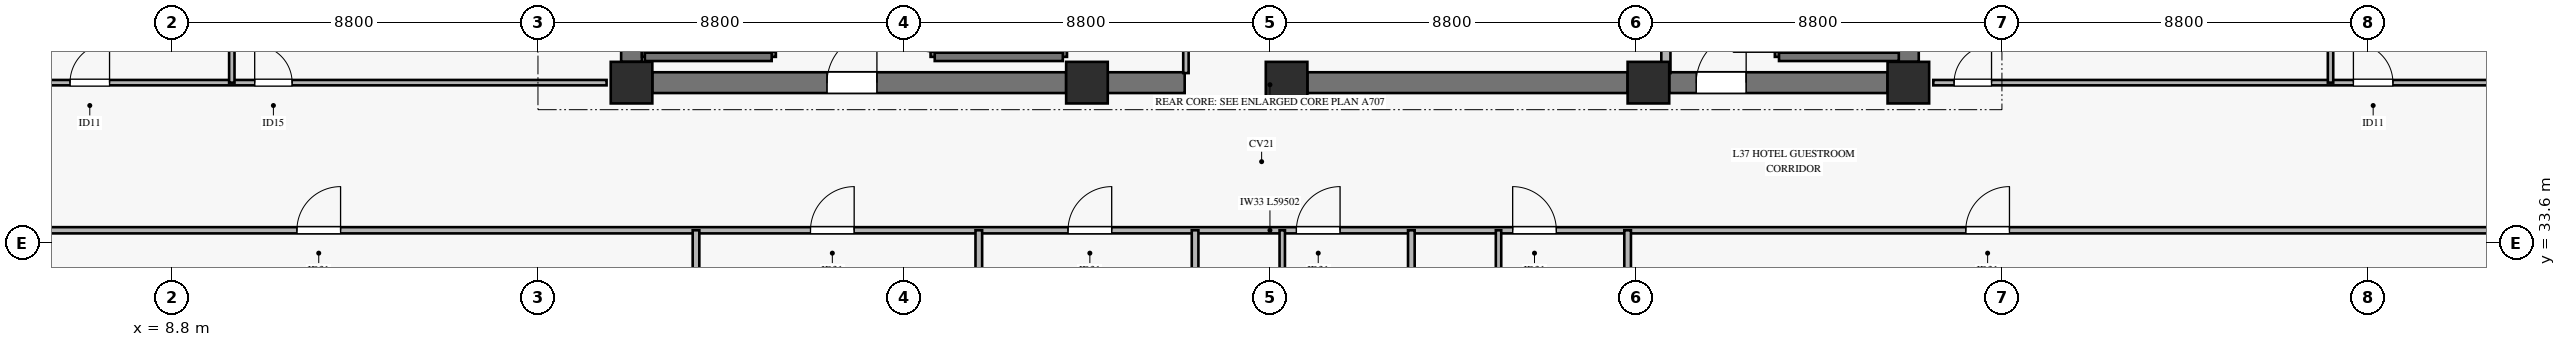
"""IFC4 building model, lengths in metres.
Left out: names, types, materials, properties, quantities, classifications, styles, units other than length and angle.
Written with IfcOpenShell. Run it as: python <this file> out.ifc"""

import sys

from ifc_helpers import new_model, si_unit, direction, frame, frame_2d, origin, origin_2d, place, context, subcontext, project, spatial, rectangle, extrude, source, transform, mapped, element, fill, save


model = new_model("IFC4")
c1 = context("Model", 3, precision=1e-05, world=origin(), true_north=direction((0.0, 1.0)))
c2 = subcontext(c1, "Body", "Model", "MODEL_VIEW")
j1 = project(units=[si_unit("LENGTHUNIT", "METRE"), si_unit("PLANEANGLEUNIT", "RADIAN")], contexts=[c1])
p1 = place(None, origin())
s1 = spatial("IfcSite", under=j1, at=p1, CompositionType="ELEMENT")
p2 = place(p1, origin())
s2 = spatial("IfcBuilding", under=s1, at=p2, CompositionType="ELEMENT")
p3 = place(p2, frame((0.0, 0.0, 152.7)))
s3 = spatial("IfcBuildingStorey", under=s2, at=p3, CompositionType="ELEMENT", Elevation=152.7)
m1 = source(origin(), c2, "Body", "SweptSolid", [
    extrude(rectangle(XDim=1.0, YDim=1.0, at=origin_2d()), origin(), (0.0, 0.0, 1.0), 3.27),
])
for number, where, z_axis, x_axis in (
    (1, (19.85, 37.45, 0.0), (0.0, 0.0, 1.0), (1.0, 0.0, 0.0)),
    (2, (30.8, 37.45, 0.0), (0.0, 0.0, 1.0), (1.0, 0.0, 0.0)),
    (3, (35.6, 37.45, 0.0), (0.0, 0.0, 1.0), (1.0, 0.0, 0.0)),
    (4, (44.3, 37.45, 0.0), (0.0, 0.0, 1.0), (1.0, 0.0, 0.0)),
    (5, (50.55, 37.45, 0.0), (0.0, 0.0, 1.0), (1.0, 0.0, 0.0)),
):
    element("IfcColumn", number, at=place(p3, frame(where, z_axis=z_axis, x_axis=x_axis)), inside=s3, PredefinedType="PILASTER", context=c2, shape_type="MappedRepresentation", body=[
        mapped(m1, transform((0.0, 0.0, 0.0), x_axis=(1.0, 0.0, 0.0), y_axis=(0.0, 1.0, 0.0), z_axis=(0.0, 0.0, 1.0), scale=1.0)),
    ])
p4 = place(p3, frame((20.35, 37.45, 0.0), z_axis=(0.0, 0.0, 1.0), x_axis=(1.0, 0.0, 0.0)))
e6 = element("IfcWall", 6, at=p4, inside=s3, PredefinedType="SHEAR", context=c2, shape_type="SweptSolid", body=[
    extrude(rectangle(XDim=9.95, YDim=0.5, at=frame_2d((4.975, 0.0))), origin(), (0.0, 0.0, 1.0), 3.27),
])
p5 = place(p4, frame((4.2, 0.0, 0.0)))
e7 = element("IfcOpeningElement", 7, at=p5, cuts=e6, PredefinedType="OPENING", context=c2, shape_type="SweptSolid", body=[
    extrude(rectangle(XDim=1.2, YDim=2.15, at=frame_2d((0.6, 1.075))), frame((0.0, 0.26, 0.0), z_axis=(0.0, -1.0, 0.0), x_axis=(1.0, 0.0, 0.0)), (0.0, 0.0, 1.0), 0.52),
])
p6 = place(p3, frame((31.3, 37.45, 0.0), z_axis=(0.0, 0.0, 1.0), x_axis=(1.0, 0.0, 0.0)))
e8 = element("IfcWall", 8, at=p6, inside=s3, PredefinedType="SHEAR", context=c2, shape_type="SweptSolid", body=[
    extrude(rectangle(XDim=1.85, YDim=0.5, at=frame_2d((0.925, 0.0))), origin(), (0.0, 0.0, 1.0), 3.27),
])
p7 = place(p3, frame((36.1, 37.45, 0.0), z_axis=(0.0, 0.0, 1.0), x_axis=(1.0, 0.0, 0.0)))
e9 = element("IfcWall", 9, at=p7, inside=s3, PredefinedType="SHEAR", context=c2, shape_type="SweptSolid", body=[
    extrude(rectangle(XDim=7.7, YDim=0.5, at=frame_2d((3.85, 0.0))), origin(), (0.0, 0.0, 1.0), 3.27),
])
p8 = place(p3, frame((44.8, 37.45, 0.0), z_axis=(0.0, 0.0, 1.0), x_axis=(1.0, 0.0, 0.0)))
e10 = element("IfcWall", 10, at=p8, inside=s3, PredefinedType="SHEAR", context=c2, shape_type="SweptSolid", body=[
    extrude(rectangle(XDim=5.25, YDim=0.5, at=frame_2d((2.625, 0.0))), origin(), (0.0, 0.0, 1.0), 3.27),
])
p9 = place(p8, frame((0.65, 0.0, 0.0)))
e11 = element("IfcOpeningElement", 11, at=p9, cuts=e10, PredefinedType="OPENING", context=c2, shape_type="SweptSolid", body=[
    extrude(rectangle(XDim=1.2, YDim=2.15, at=frame_2d((0.6, 1.075))), frame((0.0, 0.26, 0.0), z_axis=(0.0, -1.0, 0.0), x_axis=(1.0, 0.0, 0.0)), (0.0, 0.0, 1.0), 0.52),
])
for number, where, z_axis, x_axis in (
    (12, (19.85, 37.95, 0.0), (0.0, 0.0, 1.0), (0.0, 1.0, 0.0)),
    (13, (50.55, 37.95, 0.0), (0.0, 0.0, 1.0), (0.0, 1.0, 0.0)),
):
    element("IfcWall", number, at=place(p3, frame(where, z_axis=z_axis, x_axis=x_axis)), inside=s3, PredefinedType="SHEAR", context=c2, shape_type="SweptSolid", body=[
        extrude(rectangle(XDim=8.1, YDim=0.5, at=frame_2d((4.05, 0.0))), origin(), (0.0, 0.0, 1.0), 3.27),
    ])
p10 = place(p3, frame((20.17, 38.07, 0.0), z_axis=(0.0, 0.0, 1.0), x_axis=(0.0, 1.0, 0.0)))
e14 = element("IfcWall", 14, at=p10, inside=s3, PredefinedType="SOLIDWALL", context=c2, shape_type="SweptSolid", body=[
    extrude(rectangle(XDim=7.25, YDim=0.14, at=frame_2d((3.625, 0.0))), origin(), (0.0, 0.0, 1.0), 3.5),
])
p11 = place(p3, frame((23.22, 38.07, 0.0), z_axis=(0.0, 0.0, 1.0), x_axis=(0.0, 1.0, 0.0)))
e15 = element("IfcWall", 15, at=p11, inside=s3, PredefinedType="SOLIDWALL", context=c2, shape_type="SweptSolid", body=[
    extrude(rectangle(XDim=7.25, YDim=0.2, at=frame_2d((3.625, 0.0))), origin(), (0.0, 0.0, 1.0), 3.5),
])
p12 = place(p11, frame((0.11, 0.0, 0.0)))
e16 = element("IfcOpeningElement", 16, at=p12, cuts=e15, PredefinedType="OPENING", context=c2, shape_type="SweptSolid", body=[
    extrude(rectangle(XDim=1.1, YDim=2.15, at=frame_2d((0.55, 1.075))), frame((0.0, 0.11, 0.0), z_axis=(0.0, -1.0, 0.0), x_axis=(1.0, 0.0, 0.0)), (0.0, 0.0, 1.0), 0.22),
])
p13 = place(p3, frame((20.17, 38.07, 0.0), z_axis=(0.0, 0.0, 1.0), x_axis=(1.0, 0.0, 0.0)))
e17 = element("IfcWall", 17, at=p13, inside=s3, PredefinedType="SOLIDWALL", context=c2, shape_type="SweptSolid", body=[
    extrude(rectangle(XDim=3.05, YDim=0.2, at=frame_2d((1.525, 0.0))), origin(), (0.0, 0.0, 1.0), 3.5),
])
p14 = place(p3, frame((27.14, 38.07, 0.0), z_axis=(0.0, 0.0, 1.0), x_axis=(0.0, 1.0, 0.0)))
e18 = element("IfcWall", 18, at=p14, inside=s3, PredefinedType="SOLIDWALL", context=c2, shape_type="SweptSolid", body=[
    extrude(rectangle(XDim=7.25, YDim=0.2, at=frame_2d((3.625, 0.0))), origin(), (0.0, 0.0, 1.0), 3.5),
])
p15 = place(p14, frame((0.11, 0.0, 0.0)))
e19 = element("IfcOpeningElement", 19, at=p15, cuts=e18, PredefinedType="OPENING", context=c2, shape_type="SweptSolid", body=[
    extrude(rectangle(XDim=1.1, YDim=2.15, at=frame_2d((0.55, 1.075))), frame((0.0, 0.11, 0.0), z_axis=(0.0, -1.0, 0.0), x_axis=(1.0, 0.0, 0.0)), (0.0, 0.0, 1.0), 0.22),
])
p16 = place(p3, frame((30.22, 38.07, 0.0), z_axis=(0.0, 0.0, 1.0), x_axis=(0.0, 1.0, 0.0)))
e20 = element("IfcWall", 20, at=p16, inside=s3, PredefinedType="SOLIDWALL", context=c2, shape_type="SweptSolid", body=[
    extrude(rectangle(XDim=7.25, YDim=0.2, at=frame_2d((3.625, 0.0))), origin(), (0.0, 0.0, 1.0), 3.5),
])
p17 = place(p3, frame((27.14, 38.07, 0.0), z_axis=(0.0, 0.0, 1.0), x_axis=(1.0, 0.0, 0.0)))
e21 = element("IfcWall", 21, at=p17, inside=s3, PredefinedType="SOLIDWALL", context=c2, shape_type="SweptSolid", body=[
    extrude(rectangle(XDim=3.08, YDim=0.2, at=frame_2d((1.54, 0.0))), origin(), (0.0, 0.0, 1.0), 3.5),
])
p18 = place(p3, frame((47.44, 38.07, 0.0), z_axis=(0.0, 0.0, 1.0), x_axis=(0.0, 1.0, 0.0)))
e22 = element("IfcWall", 22, at=p18, inside=s3, PredefinedType="SOLIDWALL", context=c2, shape_type="SweptSolid", body=[
    extrude(rectangle(XDim=7.25, YDim=0.2, at=frame_2d((3.625, 0.0))), origin(), (0.0, 0.0, 1.0), 3.5),
])
p19 = place(p18, frame((0.11, 0.0, 0.0)))
e23 = element("IfcOpeningElement", 23, at=p19, cuts=e22, PredefinedType="OPENING", context=c2, shape_type="SweptSolid", body=[
    extrude(rectangle(XDim=1.1, YDim=2.15, at=frame_2d((0.55, 1.075))), frame((0.0, 0.11, 0.0), z_axis=(0.0, -1.0, 0.0), x_axis=(1.0, 0.0, 0.0)), (0.0, 0.0, 1.0), 0.22),
])
p20 = place(p3, frame((47.44, 38.07, 0.0), z_axis=(0.0, 0.0, 1.0), x_axis=(1.0, 0.0, 0.0)))
e24 = element("IfcWall", 24, at=p20, inside=s3, PredefinedType="SOLIDWALL", context=c2, shape_type="SweptSolid", body=[
    extrude(rectangle(XDim=2.88, YDim=0.2, at=frame_2d((1.44, 0.0))), origin(), (0.0, 0.0, 1.0), 3.5),
])
p21 = place(p3, frame((44.72, 37.68, 0.0), z_axis=(0.0, 0.0, 1.0), x_axis=(0.0, 1.0, 0.0)))
e25 = element("IfcWall", 25, at=p21, inside=s3, PredefinedType="SOLIDWALL", context=c2, shape_type="SweptSolid", body=[
    extrude(rectangle(XDim=7.54, YDim=0.22, at=frame_2d((3.77, 0.0))), origin(), (0.0, 0.0, 1.0), 3.27),
])
p22 = place(p3, frame((33.18, 37.68, 0.0), z_axis=(0.0, 0.0, 1.0), x_axis=(0.0, 1.0, 0.0)))
e26 = element("IfcWall", 26, at=p22, inside=s3, PredefinedType="PARTITIONING", context=c2, shape_type="SweptSolid", body=[
    extrude(rectangle(XDim=6.47, YDim=0.13, at=frame_2d((3.235, 0.0))), origin(), (0.0, 0.0, 1.0), 2.355),
])
p23 = place(p22, frame((1.27, 0.0, 0.0)))
e27 = element("IfcOpeningElement", 27, at=p23, cuts=e26, PredefinedType="OPENING", context=c2, shape_type="SweptSolid", body=[
    extrude(rectangle(XDim=0.9, YDim=2.1, at=frame_2d((0.45, 1.05))), frame((0.0, 0.075, 0.0), z_axis=(0.0, -1.0, 0.0), x_axis=(1.0, 0.0, 0.0)), (0.0, 0.0, 1.0), 0.15),
])
p24 = place(p22, frame((4.62, 0.0, 0.0)))
e28 = element("IfcOpeningElement", 28, at=p24, cuts=e26, PredefinedType="OPENING", context=c2, shape_type="SweptSolid", body=[
    extrude(rectangle(XDim=0.9, YDim=2.1, at=frame_2d((0.45, 1.05))), frame((0.0, 0.075, 0.0), z_axis=(0.0, -1.0, 0.0), x_axis=(1.0, 0.0, 0.0)), (0.0, 0.0, 1.0), 0.15),
])
p25 = place(p3, frame((5.449, 33.9, 0.0), z_axis=(0.0, 0.0, 1.0), x_axis=(1.0, 0.0, 0.0)))
e29 = element("IfcWall", 29, at=p25, inside=s3, PredefinedType="PARTITIONING", context=c2, shape_type="SweptSolid", body=[
    extrude(rectangle(XDim=59.502, YDim=0.15, at=frame_2d((29.751, 0.0))), origin(), (0.0, 0.0, 1.0), 2.455),
])
p26 = place(p25, frame((6.355, 0.0, 0.0)))
e30 = element("IfcOpeningElement", 30, at=p26, cuts=e29, PredefinedType="OPENING", context=c2, shape_type="SweptSolid", body=[
    extrude(rectangle(XDim=1.05, YDim=2.15, at=frame_2d((0.525, 1.075))), frame((0.0, 0.085, 0.0), z_axis=(0.0, -1.0, 0.0), x_axis=(1.0, 0.0, 0.0)), (0.0, 0.0, 1.0), 0.17),
])
p27 = place(p25, frame((18.704, 0.0, 0.0)))
e31 = element("IfcOpeningElement", 31, at=p27, cuts=e29, PredefinedType="OPENING", context=c2, shape_type="SweptSolid", body=[
    extrude(rectangle(XDim=1.05, YDim=2.15, at=frame_2d((0.525, 1.075))), frame((0.0, 0.085, 0.0), z_axis=(0.0, -1.0, 0.0), x_axis=(1.0, 0.0, 0.0)), (0.0, 0.0, 1.0), 0.17),
])
p28 = place(p25, frame((24.896, 0.0, 0.0)))
e32 = element("IfcOpeningElement", 32, at=p28, cuts=e29, PredefinedType="OPENING", context=c2, shape_type="SweptSolid", body=[
    extrude(rectangle(XDim=1.05, YDim=2.15, at=frame_2d((0.525, 1.075))), frame((0.0, 0.085, 0.0), z_axis=(0.0, -1.0, 0.0), x_axis=(1.0, 0.0, 0.0)), (0.0, 0.0, 1.0), 0.17),
])
p29 = place(p25, frame((30.387, 0.0, 0.0)))
e33 = element("IfcOpeningElement", 33, at=p29, cuts=e29, PredefinedType="OPENING", context=c2, shape_type="SweptSolid", body=[
    extrude(rectangle(XDim=1.05, YDim=2.15, at=frame_2d((0.525, 1.075))), frame((0.0, 0.085, 0.0), z_axis=(0.0, -1.0, 0.0), x_axis=(1.0, 0.0, 0.0)), (0.0, 0.0, 1.0), 0.17),
])
p30 = place(p25, frame((35.587, 0.0, 0.0)))
e34 = element("IfcOpeningElement", 34, at=p30, cuts=e29, PredefinedType="OPENING", context=c2, shape_type="SweptSolid", body=[
    extrude(rectangle(XDim=1.05, YDim=2.15, at=frame_2d((0.525, 1.075))), frame((0.0, 0.085, 0.0), z_axis=(0.0, -1.0, 0.0), x_axis=(1.0, 0.0, 0.0)), (0.0, 0.0, 1.0), 0.17),
])
p31 = place(p25, frame((46.482, 0.0, 0.0)))
e35 = element("IfcOpeningElement", 35, at=p31, cuts=e29, PredefinedType="OPENING", context=c2, shape_type="SweptSolid", body=[
    extrude(rectangle(XDim=1.05, YDim=2.15, at=frame_2d((0.525, 1.075))), frame((0.0, 0.085, 0.0), z_axis=(0.0, -1.0, 0.0), x_axis=(1.0, 0.0, 0.0)), (0.0, 0.0, 1.0), 0.17),
])
for number, where, z_axis, x_axis in (
    (36, (21.4, 8.572, 0.0), (0.0, 0.0, 1.0), (0.0, 1.0, 0.0)),
    (37, (28.2, 8.572, 0.0), (0.0, 0.0, 1.0), (0.0, 1.0, 0.0)),
    (38, (33.4, 8.572, 0.0), (0.0, 0.0, 1.0), (0.0, 1.0, 0.0)),
):
    element("IfcWall", number, at=place(p3, frame(where, z_axis=z_axis, x_axis=x_axis)), inside=s3, PredefinedType="PARTITIONING", context=c2, shape_type="SweptSolid", body=[
        extrude(rectangle(XDim=25.328, YDim=0.16, at=frame_2d((12.664, 0.0))), origin(), (0.0, 0.0, 1.0), 2.755),
    ])
p32 = place(p3, frame((35.496, 31.35, 0.0), z_axis=(0.0, 0.0, 1.0), x_axis=(0.0, 1.0, 0.0)))
e39 = element("IfcWall", 39, at=p32, inside=s3, PredefinedType="PARTITIONING", context=c2, shape_type="SweptSolid", body=[
    extrude(rectangle(XDim=2.55, YDim=0.13, at=frame_2d((1.275, 0.0))), origin(), (0.0, 0.0, 1.0), 2.805),
])
p33 = place(p3, frame((38.6, 8.572, 0.0), z_axis=(0.0, 0.0, 1.0), x_axis=(0.0, 1.0, 0.0)))
e40 = element("IfcWall", 40, at=p33, inside=s3, PredefinedType="PARTITIONING", context=c2, shape_type="SweptSolid", body=[
    extrude(rectangle(XDim=25.328, YDim=0.16, at=frame_2d((12.664, 0.0))), origin(), (0.0, 0.0, 1.0), 2.755),
])
p34 = place(p3, frame((40.696, 31.35, 0.0), z_axis=(0.0, 0.0, 1.0), x_axis=(0.0, 1.0, 0.0)))
e41 = element("IfcWall", 41, at=p34, inside=s3, PredefinedType="PARTITIONING", context=c2, shape_type="SweptSolid", body=[
    extrude(rectangle(XDim=2.55, YDim=0.13, at=frame_2d((1.275, 0.0))), origin(), (0.0, 0.0, 1.0), 2.805),
])
p35 = place(p3, frame((43.8, 8.572, 0.0), z_axis=(0.0, 0.0, 1.0), x_axis=(0.0, 1.0, 0.0)))
e42 = element("IfcWall", 42, at=p35, inside=s3, PredefinedType="PARTITIONING", context=c2, shape_type="SweptSolid", body=[
    extrude(rectangle(XDim=25.328, YDim=0.16, at=frame_2d((12.664, 0.0))), origin(), (0.0, 0.0, 1.0), 2.755),
])
p36 = place(p3, frame((5.449, 37.45, 0.0), z_axis=(0.0, 0.0, 1.0), x_axis=(1.0, 0.0, 0.0)))
e43 = element("IfcWall", 43, at=p36, inside=s3, PredefinedType="PARTITIONING", context=c2, shape_type="SweptSolid", body=[
    extrude(rectangle(XDim=13.801, YDim=0.13, at=frame_2d((6.9, 0.0))), origin(), (0.0, 0.0, 1.0), 2.755),
])
p37 = place(p36, frame((0.9, 0.0, 0.0)))
e44 = element("IfcOpeningElement", 44, at=p37, cuts=e43, PredefinedType="OPENING", context=c2, shape_type="SweptSolid", body=[
    extrude(rectangle(XDim=0.95, YDim=2.1, at=frame_2d((0.475, 1.05))), frame((0.0, 0.075, 0.0), z_axis=(0.0, -1.0, 0.0), x_axis=(1.0, 0.0, 0.0)), (0.0, 0.0, 1.0), 0.15),
])
p38 = place(p36, frame((5.34, 0.0, 0.0)))
e45 = element("IfcOpeningElement", 45, at=p38, cuts=e43, PredefinedType="OPENING", context=c2, shape_type="SweptSolid", body=[
    extrude(rectangle(XDim=0.9, YDim=2.1, at=frame_2d((0.45, 1.05))), frame((0.0, 0.075, 0.0), z_axis=(0.0, -1.0, 0.0), x_axis=(1.0, 0.0, 0.0)), (0.0, 0.0, 1.0), 0.15),
])
p39 = place(p3, frame((10.239, 37.45, 0.0), z_axis=(0.0, 0.0, 1.0), x_axis=(0.0, 1.0, 0.0)))
e46 = element("IfcWall", 46, at=p39, inside=s3, PredefinedType="PARTITIONING", context=c2, shape_type="SweptSolid", body=[
    extrude(rectangle(XDim=8.8, YDim=0.13, at=frame_2d((4.4, 0.0))), origin(), (0.0, 0.0, 1.0), 3.27),
])
p40 = place(p3, frame((51.15, 37.45, 0.0), z_axis=(0.0, 0.0, 1.0), x_axis=(1.0, 0.0, 0.0)))
e47 = element("IfcWall", 47, at=p40, inside=s3, PredefinedType="PARTITIONING", context=c2, shape_type="SweptSolid", body=[
    extrude(rectangle(XDim=13.801, YDim=0.13, at=frame_2d((6.9, 0.0))), origin(), (0.0, 0.0, 1.0), 2.755),
])
p41 = place(p40, frame((0.5, 0.0, 0.0)))
e48 = element("IfcOpeningElement", 48, at=p41, cuts=e47, PredefinedType="OPENING", context=c2, shape_type="SweptSolid", body=[
    extrude(rectangle(XDim=0.9, YDim=2.1, at=frame_2d((0.45, 1.05))), frame((0.0, 0.075, 0.0), z_axis=(0.0, -1.0, 0.0), x_axis=(1.0, 0.0, 0.0)), (0.0, 0.0, 1.0), 0.15),
])
p42 = place(p40, frame((10.101, 0.0, 0.0)))
e49 = element("IfcOpeningElement", 49, at=p42, cuts=e47, PredefinedType="OPENING", context=c2, shape_type="SweptSolid", body=[
    extrude(rectangle(XDim=0.95, YDim=2.1, at=frame_2d((0.475, 1.05))), frame((0.0, 0.075, 0.0), z_axis=(0.0, -1.0, 0.0), x_axis=(1.0, 0.0, 0.0)), (0.0, 0.0, 1.0), 0.15),
])
p43 = place(p3, frame((60.701, 37.45, 0.0), z_axis=(0.0, 0.0, 1.0), x_axis=(0.0, 1.0, 0.0)))
e50 = element("IfcWall", 50, at=p43, inside=s3, PredefinedType="PARTITIONING", context=c2, shape_type="SweptSolid", body=[
    extrude(rectangle(XDim=8.8, YDim=0.13, at=frame_2d((4.4, 0.0))), origin(), (0.0, 0.0, 1.0), 3.27),
])
m2 = source(origin(), c2, "Body", "SweptSolid", [
    extrude(rectangle(XDim=1.2, YDim=2.15, at=frame_2d((0.6, 1.075))), frame((0.0, 0.025, 0.0), z_axis=(0.0, -1.0, 0.0), x_axis=(1.0, 0.0, 0.0)), (0.0, 0.0, 1.0), 0.05),
])
p44 = place(p5, origin())
e51 = element("IfcDoor", 51, at=p44, inside=s3, OperationType="SINGLE_SWING_RIGHT", PredefinedType="DOOR", context=c2, shape_type="MappedRepresentation", body=[
    mapped(m2, transform((0.0, 0.0, 0.0), x_axis=(1.0, 0.0, 0.0), y_axis=(0.0, 1.0, 0.0), z_axis=(0.0, 0.0, 1.0), scale=1.0)),
])
fill(e7, e51)
p45 = place(p9, origin())
e52 = element("IfcDoor", 52, at=p45, inside=s3, OperationType="SINGLE_SWING_RIGHT", PredefinedType="DOOR", context=c2, shape_type="MappedRepresentation", body=[
    mapped(m2, transform((0.0, 0.0, 0.0), x_axis=(1.0, 0.0, 0.0), y_axis=(0.0, 1.0, 0.0), z_axis=(0.0, 0.0, 1.0), scale=1.0)),
])
fill(e11, e52)
m3 = source(origin(), c2, "Body", "SweptSolid", [
    extrude(rectangle(XDim=1.05, YDim=2.15, at=frame_2d((0.525, 1.075))), frame((0.0, 0.025, 0.0), z_axis=(0.0, -1.0, 0.0), x_axis=(1.0, 0.0, 0.0)), (0.0, 0.0, 1.0), 0.05),
])
p46 = place(p26, origin())
e53 = element("IfcDoor", 53, at=p46, inside=s3, OperationType="SINGLE_SWING_RIGHT", PredefinedType="DOOR", context=c2, shape_type="MappedRepresentation", body=[
    mapped(m3, transform((0.0, 0.0, 0.0), x_axis=(1.0, 0.0, 0.0), y_axis=(0.0, 1.0, 0.0), z_axis=(0.0, 0.0, 1.0), scale=1.0)),
])
fill(e30, e53)
p47 = place(p27, origin())
e54 = element("IfcDoor", 54, at=p47, inside=s3, OperationType="SINGLE_SWING_RIGHT", PredefinedType="DOOR", context=c2, shape_type="MappedRepresentation", body=[
    mapped(m3, transform((0.0, 0.0, 0.0), x_axis=(1.0, 0.0, 0.0), y_axis=(0.0, 1.0, 0.0), z_axis=(0.0, 0.0, 1.0), scale=1.0)),
])
fill(e31, e54)
p48 = place(p28, origin())
e55 = element("IfcDoor", 55, at=p48, inside=s3, OperationType="SINGLE_SWING_RIGHT", PredefinedType="DOOR", context=c2, shape_type="MappedRepresentation", body=[
    mapped(m3, transform((0.0, 0.0, 0.0), x_axis=(1.0, 0.0, 0.0), y_axis=(0.0, 1.0, 0.0), z_axis=(0.0, 0.0, 1.0), scale=1.0)),
])
fill(e32, e55)
p49 = place(p29, origin())
e56 = element("IfcDoor", 56, at=p49, inside=s3, OperationType="SINGLE_SWING_RIGHT", PredefinedType="DOOR", context=c2, shape_type="MappedRepresentation", body=[
    mapped(m3, transform((0.0, 0.0, 0.0), x_axis=(1.0, 0.0, 0.0), y_axis=(0.0, 1.0, 0.0), z_axis=(0.0, 0.0, 1.0), scale=1.0)),
])
fill(e33, e56)
p50 = place(p30, origin())
e57 = element("IfcDoor", 57, at=p50, inside=s3, OperationType="SINGLE_SWING_LEFT", PredefinedType="DOOR", context=c2, shape_type="MappedRepresentation", body=[
    mapped(m3, transform((0.0, 0.0, 0.0), x_axis=(1.0, 0.0, 0.0), y_axis=(0.0, 1.0, 0.0), z_axis=(0.0, 0.0, 1.0), scale=1.0)),
])
fill(e34, e57)
p51 = place(p31, origin())
e58 = element("IfcDoor", 58, at=p51, inside=s3, OperationType="SINGLE_SWING_RIGHT", PredefinedType="DOOR", context=c2, shape_type="MappedRepresentation", body=[
    mapped(m3, transform((0.0, 0.0, 0.0), x_axis=(1.0, 0.0, 0.0), y_axis=(0.0, 1.0, 0.0), z_axis=(0.0, 0.0, 1.0), scale=1.0)),
])
fill(e35, e58)
m4 = source(origin(), c2, "Body", "SweptSolid", [
    extrude(rectangle(XDim=0.95, YDim=2.1, at=frame_2d((0.475, 1.05))), frame((0.0, 0.025, 0.0), z_axis=(0.0, -1.0, 0.0), x_axis=(1.0, 0.0, 0.0)), (0.0, 0.0, 1.0), 0.05),
])
p52 = place(p37, origin())
e59 = element("IfcDoor", 59, at=p52, inside=s3, OperationType="SINGLE_SWING_RIGHT", PredefinedType="DOOR", context=c2, shape_type="MappedRepresentation", body=[
    mapped(m4, transform((0.0, 0.0, 0.0), x_axis=(1.0, 0.0, 0.0), y_axis=(0.0, 1.0, 0.0), z_axis=(0.0, 0.0, 1.0), scale=1.0)),
])
fill(e44, e59)
m5 = source(origin(), c2, "Body", "SweptSolid", [
    extrude(rectangle(XDim=0.9, YDim=2.1, at=frame_2d((0.45, 1.05))), frame((0.0, 0.025, 0.0), z_axis=(0.0, -1.0, 0.0), x_axis=(1.0, 0.0, 0.0)), (0.0, 0.0, 1.0), 0.05),
])
p53 = place(p38, origin())
e60 = element("IfcDoor", 60, at=p53, inside=s3, OperationType="SINGLE_SWING_LEFT", PredefinedType="DOOR", context=c2, shape_type="MappedRepresentation", body=[
    mapped(m5, transform((0.0, 0.0, 0.0), x_axis=(1.0, 0.0, 0.0), y_axis=(0.0, 1.0, 0.0), z_axis=(0.0, 0.0, 1.0), scale=1.0)),
])
fill(e45, e60)
p54 = place(p41, origin())
e61 = element("IfcDoor", 61, at=p54, inside=s3, OperationType="SINGLE_SWING_RIGHT", PredefinedType="DOOR", context=c2, shape_type="MappedRepresentation", body=[
    mapped(m5, transform((0.0, 0.0, 0.0), x_axis=(1.0, 0.0, 0.0), y_axis=(0.0, 1.0, 0.0), z_axis=(0.0, 0.0, 1.0), scale=1.0)),
])
fill(e48, e61)
p55 = place(p42, origin())
e62 = element("IfcDoor", 62, at=p55, inside=s3, OperationType="SINGLE_SWING_LEFT", PredefinedType="DOOR", context=c2, shape_type="MappedRepresentation", body=[
    mapped(m4, transform((0.0, 0.0, 0.0), x_axis=(1.0, 0.0, 0.0), y_axis=(0.0, 1.0, 0.0), z_axis=(0.0, 0.0, 1.0), scale=1.0)),
])
fill(e49, e62)
save(model, sys.argv[1])
